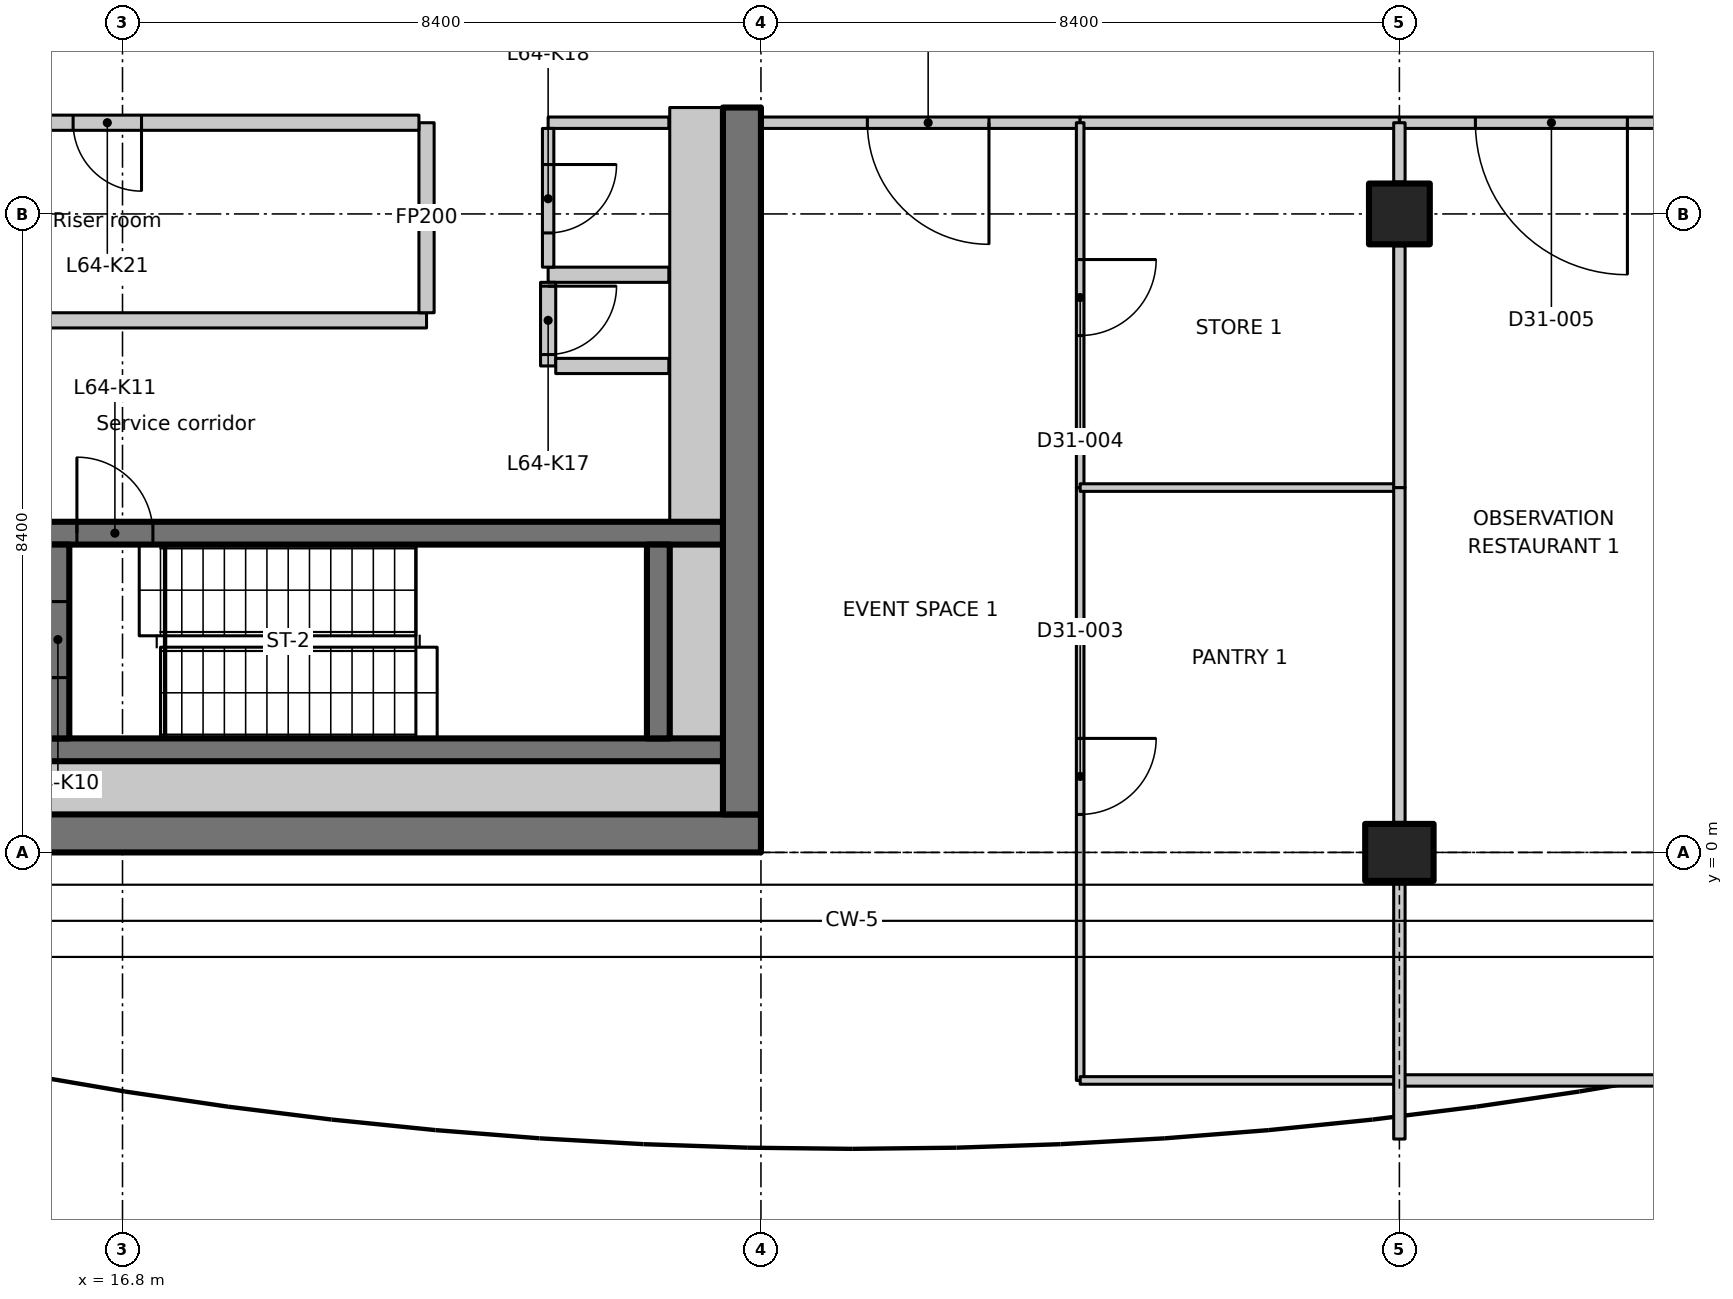
"""IFC4 building model, lengths in metres.
Left out: names, types, materials, properties, quantities, classifications, styles, units other than length and angle.
Written with IfcOpenShell. Run it as: python <this file> out.ifc"""

import sys

from ifc_helpers import new_model, si_unit, direction, frame, frame_2d, origin, origin_2d, place, context, subcontext, project, spatial, polyline, rectangle, outline, extrude, element, fill, save


model = new_model("IFC4")
c1 = context("Model", 3, precision=1e-05, world=origin(), true_north=direction((0.0, 1.0)))
c2 = subcontext(c1, "Body", "Model", "MODEL_VIEW")
j1 = project(units=[si_unit("LENGTHUNIT", "METRE"), si_unit("PLANEANGLEUNIT", "RADIAN")], contexts=[c1])
p1 = place(None, origin())
s1 = spatial("IfcSite", under=j1, at=p1, CompositionType="ELEMENT")
p2 = place(p1, origin())
s2 = spatial("IfcBuilding", under=s1, at=p2, CompositionType="ELEMENT")
p3 = place(p2, frame((0.0, 0.0, 251.7)))
s3 = spatial("IfcBuildingStorey", under=s2, at=p3, CompositionType="ELEMENT", Elevation=251.7)
p4 = place(p3, frame((33.6, 0.0, 0.0), z_axis=(0.0, 0.0, 1.0), x_axis=(0.0, 1.0, 0.0)))
e1 = element("IfcColumn", 1, at=p4, inside=s3, PredefinedType="COLUMN", context=c2, shape_type="SweptSolid", body=[
    extrude(rectangle(XDim=0.75, YDim=0.9, at=origin_2d()), origin(), (0.0, 0.0, 1.0), 4.05),
])
p5 = place(p3, frame((33.6, 8.4, 0.0), z_axis=(0.0, 0.0, 1.0), x_axis=(1.0, 0.0, 0.0)))
e2 = element("IfcColumn", 2, at=p5, inside=s3, PredefinedType="COLUMN", context=c2, shape_type="SweptSolid", body=[
    extrude(rectangle(XDim=0.8, YDim=0.8, at=origin_2d()), origin(), (0.0, 0.0, 1.0), 4.05),
])
p6 = place(p3, frame((7.436, 0.25, 0.0), z_axis=(0.0, 0.0, 1.0), x_axis=(1.0, 0.0, 0.0)))
e3 = element("IfcWall", 3, at=p6, inside=s3, PredefinedType="SHEAR", context=c2, shape_type="SweptSolid", body=[
    extrude(rectangle(XDim=17.764, YDim=0.5, at=frame_2d((8.882, 0.0))), origin(), (0.0, 0.0, 1.0), 4.05),
])
p7 = place(p3, frame((24.95, 0.5, 0.0), z_axis=(0.0, 0.0, 1.0), x_axis=(0.0, 1.0, 0.0)))
e4 = element("IfcWall", 4, at=p7, inside=s3, PredefinedType="SHEAR", context=c2, shape_type="SweptSolid", body=[
    extrude(rectangle(XDim=9.3, YDim=0.5, at=frame_2d((4.65, 0.0))), origin(), (0.0, 0.0, 1.0), 4.05),
])
p8 = place(p3, frame((15.8, 1.35, 0.0), z_axis=(0.0, 0.0, 1.0), x_axis=(1.0, 0.0, 0.0)))
e5 = element("IfcWall", 5, at=p8, inside=s3, PredefinedType="SHEAR", context=c2, shape_type="SweptSolid", body=[
    extrude(rectangle(XDim=8.9, YDim=0.3, at=frame_2d((4.45, 0.0))), origin(), (0.0, 0.0, 1.0), 4.05),
])
p9 = place(p3, frame((15.8, 4.2, 0.0), z_axis=(0.0, 0.0, 1.0), x_axis=(1.0, 0.0, 0.0)))
e6 = element("IfcWall", 6, at=p9, inside=s3, PredefinedType="SHEAR", context=c2, shape_type="SweptSolid", body=[
    extrude(rectangle(XDim=8.9, YDim=0.3, at=frame_2d((4.45, 0.0))), origin(), (0.0, 0.0, 1.0), 4.05),
])
p10 = place(p9, frame((0.4, 0.0, 0.0)))
e7 = element("IfcOpeningElement", 7, at=p10, cuts=e6, PredefinedType="OPENING", context=c2, shape_type="SweptSolid", body=[
    extrude(rectangle(XDim=1.0, YDim=2.1, at=frame_2d((0.5, 1.05))), frame((0.0, 0.16, 0.0), z_axis=(0.0, -1.0, 0.0), x_axis=(1.0, 0.0, 0.0)), (0.0, 0.0, 1.0), 0.32),
])
p11 = place(p3, frame((15.95, 1.5, 0.0), z_axis=(0.0, 0.0, 1.0), x_axis=(0.0, 1.0, 0.0)))
e8 = element("IfcWall", 8, at=p11, inside=s3, PredefinedType="SHEAR", context=c2, shape_type="SweptSolid", body=[
    extrude(rectangle(XDim=2.55, YDim=0.3, at=frame_2d((1.275, 0.0))), origin(), (0.0, 0.0, 1.0), 4.05),
])
p12 = place(p11, frame((0.8, 0.0, 0.0)))
e9 = element("IfcOpeningElement", 9, at=p12, cuts=e8, PredefinedType="OPENING", context=c2, shape_type="SweptSolid", body=[
    extrude(rectangle(XDim=1.0, YDim=2.1, at=frame_2d((0.5, 1.05))), frame((0.0, 0.16, 0.0), z_axis=(0.0, -1.0, 0.0), x_axis=(1.0, 0.0, 0.0)), (0.0, 0.0, 1.0), 0.32),
])
p13 = place(p3, frame((23.85, 1.5, 0.0), z_axis=(0.0, 0.0, 1.0), x_axis=(0.0, 1.0, 0.0)))
e10 = element("IfcWall", 10, at=p13, inside=s3, PredefinedType="SHEAR", context=c2, shape_type="SweptSolid", body=[
    extrude(rectangle(XDim=2.55, YDim=0.3, at=frame_2d((1.275, 0.0))), origin(), (0.0, 0.0, 1.0), 4.05),
])
p14 = place(p3, frame((12.4, 7.0, 0.0), z_axis=(0.0, 0.0, 1.0), x_axis=(1.0, 0.0, 0.0)))
e11 = element("IfcWall", 11, at=p14, inside=s3, PredefinedType="PARTITIONING", context=c2, shape_type="SweptSolid", body=[
    extrude(rectangle(XDim=8.4, YDim=0.2, at=frame_2d((4.2, 0.0))), origin(), (0.0, 0.0, 1.0), 4.05),
])
p15 = place(p3, frame((20.8, 7.1, 0.0), z_axis=(0.0, 0.0, 1.0), x_axis=(0.0, 1.0, 0.0)))
e12 = element("IfcWall", 12, at=p15, inside=s3, PredefinedType="PARTITIONING", context=c2, shape_type="SweptSolid", body=[
    extrude(rectangle(XDim=2.5, YDim=0.2, at=frame_2d((1.25, 0.0))), origin(), (0.0, 0.0, 1.0), 4.05),
])
p16 = place(p3, frame((20.7, 9.6, 0.0), z_axis=(0.0, 0.0, 1.0), x_axis=(-1.0, 0.0, 0.0)))
e13 = element("IfcWall", 13, at=p16, inside=s3, PredefinedType="PARTITIONING", context=c2, shape_type="SweptSolid", body=[
    extrude(rectangle(XDim=8.3, YDim=0.2, at=frame_2d((4.15, 0.0))), origin(), (0.0, 0.0, 1.0), 4.05),
])
p17 = place(p16, frame((3.65, 0.0, 0.0)))
e14 = element("IfcOpeningElement", 14, at=p17, cuts=e13, PredefinedType="OPENING", context=c2, shape_type="SweptSolid", body=[
    extrude(rectangle(XDim=0.9, YDim=2.1, at=frame_2d((0.45, 1.05))), frame((0.0, 0.11, 0.0), z_axis=(0.0, -1.0, 0.0), x_axis=(1.0, 0.0, 0.0)), (0.0, 0.0, 1.0), 0.22),
])
p18 = place(p3, frame((23.988, 7.6, 0.0), z_axis=(0.0, 0.0, 1.0), x_axis=(-1.0, 0.0, 0.0)))
e15 = element("IfcWall", 15, at=p18, inside=s3, PredefinedType="PARTITIONING", context=c2, shape_type="SweptSolid", body=[
    extrude(rectangle(XDim=1.588, YDim=0.2, at=frame_2d((0.794, 0.0))), origin(), (0.0, 0.0, 1.0), 4.05),
])
p19 = place(p3, frame((22.4, 7.5, 0.0), z_axis=(0.0, 0.0, 1.0), x_axis=(0.0, -1.0, 0.0)))
e16 = element("IfcWall", 16, at=p19, inside=s3, PredefinedType="PARTITIONING", context=c2, shape_type="SweptSolid", body=[
    extrude(rectangle(XDim=1.1, YDim=0.2, at=frame_2d((0.55, 0.0))), origin(), (0.0, 0.0, 1.0), 4.05),
])
p20 = place(p19, frame((0.05, 0.0, 0.0)))
e17 = element("IfcOpeningElement", 17, at=p20, cuts=e16, PredefinedType="OPENING", context=c2, shape_type="SweptSolid", body=[
    extrude(rectangle(XDim=0.9, YDim=2.1, at=frame_2d((0.45, 1.05))), frame((0.0, 0.11, 0.0), z_axis=(0.0, -1.0, 0.0), x_axis=(1.0, 0.0, 0.0)), (0.0, 0.0, 1.0), 0.22),
])
p21 = place(p3, frame((22.5, 6.4, 0.0), z_axis=(0.0, 0.0, 1.0), x_axis=(1.0, 0.0, 0.0)))
e18 = element("IfcWall", 18, at=p21, inside=s3, PredefinedType="PARTITIONING", context=c2, shape_type="SweptSolid", body=[
    extrude(rectangle(XDim=1.488, YDim=0.2, at=frame_2d((0.744, 0.0))), origin(), (0.0, 0.0, 1.0), 4.05),
])
p22 = place(p3, frame((23.988, 9.6, 0.0), z_axis=(0.0, 0.0, 1.0), x_axis=(-1.0, 0.0, 0.0)))
e19 = element("IfcWall", 19, at=p22, inside=s3, PredefinedType="PARTITIONING", context=c2, shape_type="SweptSolid", body=[
    extrude(rectangle(XDim=1.588, YDim=0.15, at=frame_2d((0.794, 0.0))), origin(), (0.0, 0.0, 1.0), 4.05),
])
p23 = place(p3, frame((22.4, 9.525, 0.0), z_axis=(0.0, 0.0, 1.0), x_axis=(0.0, -1.0, 0.0)))
e20 = element("IfcWall", 20, at=p23, inside=s3, PredefinedType="PARTITIONING", context=c2, shape_type="SweptSolid", body=[
    extrude(rectangle(XDim=1.825, YDim=0.15, at=frame_2d((0.913, 0.0))), origin(), (0.0, 0.0, 1.0), 4.05),
])
p24 = place(p23, frame((0.475, 0.0, 0.0)))
e21 = element("IfcOpeningElement", 21, at=p24, cuts=e20, PredefinedType="OPENING", context=c2, shape_type="SweptSolid", body=[
    extrude(rectangle(XDim=0.9, YDim=2.1, at=frame_2d((0.45, 1.05))), frame((0.0, 0.085, 0.0), z_axis=(0.0, -1.0, 0.0), x_axis=(1.0, 0.0, 0.0)), (0.0, 0.0, 1.0), 0.17),
])
p25 = place(p3, frame((13.35, 0.85, 0.0), z_axis=(0.0, 0.0, 1.0), x_axis=(1.0, 0.0, 0.0)))
e22 = element("IfcWall", 22, at=p25, inside=s3, PredefinedType="PARTITIONING", context=c2, shape_type="SweptSolid", body=[
    extrude(rectangle(XDim=11.35, YDim=0.7, at=frame_2d((5.675, 0.0))), origin(), (0.0, 0.0, 1.0), 4.05),
])
p26 = place(p3, frame((24.35, 1.5, 0.0), z_axis=(0.0, 0.0, 1.0), x_axis=(0.0, 1.0, 0.0)))
e23 = element("IfcWall", 23, at=p26, inside=s3, PredefinedType="PARTITIONING", context=c2, shape_type="SweptSolid", body=[
    extrude(rectangle(XDim=2.55, YDim=0.7, at=frame_2d((1.275, 0.0))), origin(), (0.0, 0.0, 1.0), 4.05),
])
p27 = place(p3, frame((24.35, 4.35, 0.0), z_axis=(0.0, 0.0, 1.0), x_axis=(0.0, 1.0, 0.0)))
e24 = element("IfcWall", 24, at=p27, inside=s3, PredefinedType="PARTITIONING", context=c2, shape_type="SweptSolid", body=[
    extrude(rectangle(XDim=5.45, YDim=0.7, at=frame_2d((2.725, 0.0))), origin(), (0.0, 0.0, 1.0), 4.05),
])
p28 = place(p3, frame((29.4, 9.6, 0.0), z_axis=(0.0, 0.0, 1.0), x_axis=(-1.0, 0.0, 0.0)))
e25 = element("IfcWall", 25, at=p28, inside=s3, PredefinedType="PARTITIONING", context=c2, shape_type="SweptSolid", body=[
    extrude(rectangle(XDim=4.2, YDim=0.15, at=frame_2d((2.1, 0.0))), origin(), (0.0, 0.0, 1.0), 4.03),
])
p29 = place(p28, frame((1.2, 0.0, 0.0)))
e26 = element("IfcOpeningElement", 26, at=p29, cuts=e25, PredefinedType="OPENING", context=c2, shape_type="SweptSolid", body=[
    extrude(rectangle(XDim=1.6, YDim=2.1, at=frame_2d((0.8, 1.05))), frame((0.0, 0.085, 0.0), z_axis=(0.0, -1.0, 0.0), x_axis=(1.0, 0.0, 0.0)), (0.0, 0.0, 1.0), 0.17),
])
p30 = place(p3, frame((33.6, 9.6, 0.0), z_axis=(0.0, 0.0, 1.0), x_axis=(-1.0, 0.0, 0.0)))
e27 = element("IfcWall", 27, at=p30, inside=s3, PredefinedType="PARTITIONING", context=c2, shape_type="SweptSolid", body=[
    extrude(rectangle(XDim=4.2, YDim=0.15, at=frame_2d((2.1, 0.0))), origin(), (0.0, 0.0, 1.0), 4.03),
])
p31 = place(p3, frame((37.8, 9.6, 0.0), z_axis=(0.0, 0.0, 1.0), x_axis=(-1.0, 0.0, 0.0)))
e28 = element("IfcWall", 28, at=p31, inside=s3, PredefinedType="PARTITIONING", context=c2, shape_type="SweptSolid", body=[
    extrude(rectangle(XDim=4.2, YDim=0.15, at=frame_2d((2.1, 0.0))), origin(), (0.0, 0.0, 1.0), 4.03),
])
p32 = place(p31, frame((1.2, 0.0, 0.0)))
e29 = element("IfcOpeningElement", 29, at=p32, cuts=e28, PredefinedType="OPENING", context=c2, shape_type="SweptSolid", body=[
    extrude(rectangle(XDim=2.0, YDim=2.4, at=frame_2d((1.0, 1.2))), frame((0.0, 0.085, 0.0), z_axis=(0.0, -1.0, 0.0), x_axis=(1.0, 0.0, 0.0)), (0.0, 0.0, 1.0), 0.17),
])
p33 = place(p3, frame((29.4, 4.8, 0.0), z_axis=(0.0, 0.0, 1.0), x_axis=(0.0, -1.0, 0.0)))
e30 = element("IfcWall", 30, at=p33, inside=s3, PredefinedType="PARTITIONING", context=c2, shape_type="SweptSolid", body=[
    extrude(outline(polyline([(0.0, 0.0), (7.8, 0.0), (7.8, 4.03), (5.25, 4.03), (5.248, 3.68), (4.352, 3.68), (4.35, 4.03), (0.0, 4.03), (0.0, 0.0)])), frame((0.0, 0.05, 0.0), z_axis=(0.0, -1.0, 0.0), x_axis=(1.0, 0.0, 0.0)), (0.0, 0.0, 1.0), 0.1),
])
p34 = place(p33, frame((3.3, 0.0, 0.0)))
e31 = element("IfcOpeningElement", 31, at=p34, cuts=e30, PredefinedType="OPENING", context=c2, shape_type="SweptSolid", body=[
    extrude(rectangle(XDim=1.0, YDim=2.1, at=frame_2d((0.5, 1.05))), frame((0.0, 0.06, 0.0), z_axis=(0.0, -1.0, 0.0), x_axis=(1.0, 0.0, 0.0)), (0.0, 0.0, 1.0), 0.12),
])
p35 = place(p3, frame((29.4, -3.0, 0.0), z_axis=(0.0, 0.0, 1.0), x_axis=(1.0, 0.0, 0.0)))
e32 = element("IfcWall", 32, at=p35, inside=s3, PredefinedType="PARTITIONING", context=c2, shape_type="SweptSolid", body=[
    extrude(rectangle(XDim=4.2, YDim=0.1, at=frame_2d((2.1, 0.0))), origin(), (0.0, 0.0, 1.0), 3.68),
])
p36 = place(p3, frame((29.4, 9.6, 0.0), z_axis=(0.0, 0.0, 1.0), x_axis=(0.0, -1.0, 0.0)))
e33 = element("IfcWall", 33, at=p36, inside=s3, PredefinedType="PARTITIONING", context=c2, shape_type="SweptSolid", body=[
    extrude(rectangle(XDim=4.8, YDim=0.1, at=frame_2d((2.4, 0.0))), origin(), (0.0, 0.0, 1.0), 4.03),
])
p37 = place(p36, frame((1.8, 0.0, 0.0)))
e34 = element("IfcOpeningElement", 34, at=p37, cuts=e33, PredefinedType="OPENING", context=c2, shape_type="SweptSolid", body=[
    extrude(rectangle(XDim=1.0, YDim=2.1, at=frame_2d((0.5, 1.05))), frame((0.0, 0.06, 0.0), z_axis=(0.0, -1.0, 0.0), x_axis=(1.0, 0.0, 0.0)), (0.0, 0.0, 1.0), 0.12),
])
p38 = place(p3, frame((33.6, -3.0, 0.0), z_axis=(0.0, 0.0, 1.0), x_axis=(1.0, 0.0, 0.0)))
e35 = element("IfcWall", 35, at=p38, inside=s3, PredefinedType="PARTITIONING", context=c2, shape_type="SweptSolid", body=[
    extrude(rectangle(XDim=4.236, YDim=0.15, at=frame_2d((2.118, 0.0))), origin(), (0.0, 0.0, 1.0), 3.68),
])
p39 = place(p3, frame((29.4, 4.8, 0.0), z_axis=(0.0, 0.0, 1.0), x_axis=(1.0, 0.0, 0.0)))
e36 = element("IfcWall", 36, at=p39, inside=s3, PredefinedType="PARTITIONING", context=c2, shape_type="SweptSolid", body=[
    extrude(rectangle(XDim=4.2, YDim=0.1, at=frame_2d((2.1, 0.0))), origin(), (0.0, 0.0, 1.0), 4.03),
])
p40 = place(p3, frame((33.6, 4.8, 0.0), z_axis=(0.0, 0.0, 1.0), x_axis=(0.0, -1.0, 0.0)))
e37 = element("IfcWall", 37, at=p40, inside=s3, PredefinedType="PARTITIONING", context=c2, shape_type="SweptSolid", body=[
    extrude(rectangle(XDim=4.405, YDim=0.15, at=frame_2d((2.203, 0.0))), origin(), (0.0, 0.0, 1.0), 3.68),
])
p41 = place(p3, frame((33.6, -0.395, 0.0), z_axis=(0.0, 0.0, 1.0), x_axis=(0.0, -1.0, 0.0)))
e38 = element("IfcWall", 38, at=p41, inside=s3, PredefinedType="PARTITIONING", context=c2, shape_type="SweptSolid", body=[
    extrude(rectangle(XDim=3.376, YDim=0.15, at=frame_2d((1.688, 0.0))), origin(), (0.0, 0.0, 1.0), 3.68),
])
p42 = place(p3, frame((33.6, 9.6, 0.0), z_axis=(0.0, 0.0, 1.0), x_axis=(0.0, -1.0, 0.0)))
e39 = element("IfcWall", 39, at=p42, inside=s3, PredefinedType="PARTITIONING", context=c2, shape_type="SweptSolid", body=[
    extrude(rectangle(XDim=0.78, YDim=0.15, at=frame_2d((0.39, 0.0))), origin(), (0.0, 0.0, 1.0), 4.03),
])
p43 = place(p3, frame((33.6, 7.98, 0.0), z_axis=(0.0, 0.0, 1.0), x_axis=(0.0, -1.0, 0.0)))
e40 = element("IfcWall", 40, at=p43, inside=s3, PredefinedType="PARTITIONING", context=c2, shape_type="SweptSolid", body=[
    extrude(rectangle(XDim=3.18, YDim=0.15, at=frame_2d((1.59, 0.0))), origin(), (0.0, 0.0, 1.0), 4.03),
])
p44 = place(p12, origin())
e41 = element("IfcDoor", 41, at=p44, inside=s3, OperationType="SINGLE_SWING_RIGHT", PredefinedType="DOOR", context=c2, shape_type="SweptSolid", body=[
    extrude(rectangle(XDim=1.0, YDim=2.1, at=frame_2d((0.5, 1.05))), frame((0.0, 0.025, 0.0), z_axis=(0.0, -1.0, 0.0), x_axis=(1.0, 0.0, 0.0)), (0.0, 0.0, 1.0), 0.05),
])
fill(e9, e41)
p45 = place(p10, origin())
e42 = element("IfcDoor", 42, at=p45, inside=s3, OperationType="SINGLE_SWING_LEFT", PredefinedType="DOOR", context=c2, shape_type="SweptSolid", body=[
    extrude(rectangle(XDim=1.0, YDim=2.1, at=frame_2d((0.5, 1.05))), frame((0.0, 0.025, 0.0), z_axis=(0.0, -1.0, 0.0), x_axis=(1.0, 0.0, 0.0)), (0.0, 0.0, 1.0), 0.05),
])
fill(e7, e42)
p46 = place(p20, origin())
e43 = element("IfcDoor", 43, at=p46, inside=s3, OperationType="SINGLE_SWING_LEFT", PredefinedType="DOOR", context=c2, shape_type="SweptSolid", body=[
    extrude(rectangle(XDim=0.9, YDim=2.1, at=frame_2d((0.45, 1.05))), frame((0.0, 0.025, 0.0), z_axis=(0.0, -1.0, 0.0), x_axis=(1.0, 0.0, 0.0)), (0.0, 0.0, 1.0), 0.05),
])
fill(e17, e43)
p47 = place(p24, origin())
e44 = element("IfcDoor", 44, at=p47, inside=s3, OperationType="SINGLE_SWING_RIGHT", PredefinedType="DOOR", context=c2, shape_type="SweptSolid", body=[
    extrude(rectangle(XDim=0.9, YDim=2.1, at=frame_2d((0.45, 1.05))), frame((0.0, 0.025, 0.0), z_axis=(0.0, -1.0, 0.0), x_axis=(1.0, 0.0, 0.0)), (0.0, 0.0, 1.0), 0.05),
])
fill(e21, e44)
p48 = place(p17, origin())
e45 = element("IfcDoor", 45, at=p48, inside=s3, OperationType="SINGLE_SWING_LEFT", PredefinedType="DOOR", context=c2, shape_type="SweptSolid", body=[
    extrude(rectangle(XDim=0.9, YDim=2.1, at=frame_2d((0.45, 1.05))), frame((0.0, 0.025, 0.0), z_axis=(0.0, -1.0, 0.0), x_axis=(1.0, 0.0, 0.0)), (0.0, 0.0, 1.0), 0.05),
])
fill(e14, e45)
p49 = place(p29, origin())
e46 = element("IfcDoor", 46, at=p49, inside=s3, OperationType="DOUBLE_DOOR_SINGLE_SWING", PredefinedType="DOOR", context=c2, shape_type="SweptSolid", body=[
    extrude(rectangle(XDim=1.6, YDim=2.1, at=frame_2d((0.8, 1.05))), frame((0.0, 0.025, 0.0), z_axis=(0.0, -1.0, 0.0), x_axis=(1.0, 0.0, 0.0)), (0.0, 0.0, 1.0), 0.05),
])
fill(e26, e46)
p50 = place(p34, origin())
e47 = element("IfcDoor", 47, at=p50, inside=s3, OperationType="SINGLE_SWING_LEFT", PredefinedType="DOOR", context=c2, shape_type="SweptSolid", body=[
    extrude(rectangle(XDim=1.0, YDim=2.1, at=frame_2d((0.5, 1.05))), frame((0.0, 0.025, 0.0), z_axis=(0.0, -1.0, 0.0), x_axis=(1.0, 0.0, 0.0)), (0.0, 0.0, 1.0), 0.05),
])
fill(e31, e47)
p51 = place(p37, origin())
e48 = element("IfcDoor", 48, at=p51, inside=s3, OperationType="SINGLE_SWING_LEFT", PredefinedType="DOOR", context=c2, shape_type="SweptSolid", body=[
    extrude(rectangle(XDim=1.0, YDim=2.1, at=frame_2d((0.5, 1.05))), frame((0.0, 0.025, 0.0), z_axis=(0.0, -1.0, 0.0), x_axis=(1.0, 0.0, 0.0)), (0.0, 0.0, 1.0), 0.05),
])
fill(e34, e48)
p52 = place(p32, origin())
e49 = element("IfcDoor", 49, at=p52, inside=s3, OperationType="DOUBLE_DOOR_SINGLE_SWING", PredefinedType="DOOR", context=c2, shape_type="SweptSolid", body=[
    extrude(rectangle(XDim=2.0, YDim=2.4, at=frame_2d((1.0, 1.2))), frame((0.0, 0.025, 0.0), z_axis=(0.0, -1.0, 0.0), x_axis=(1.0, 0.0, 0.0)), (0.0, 0.0, 1.0), 0.05),
])
fill(e29, e49)
save(model, sys.argv[1])
